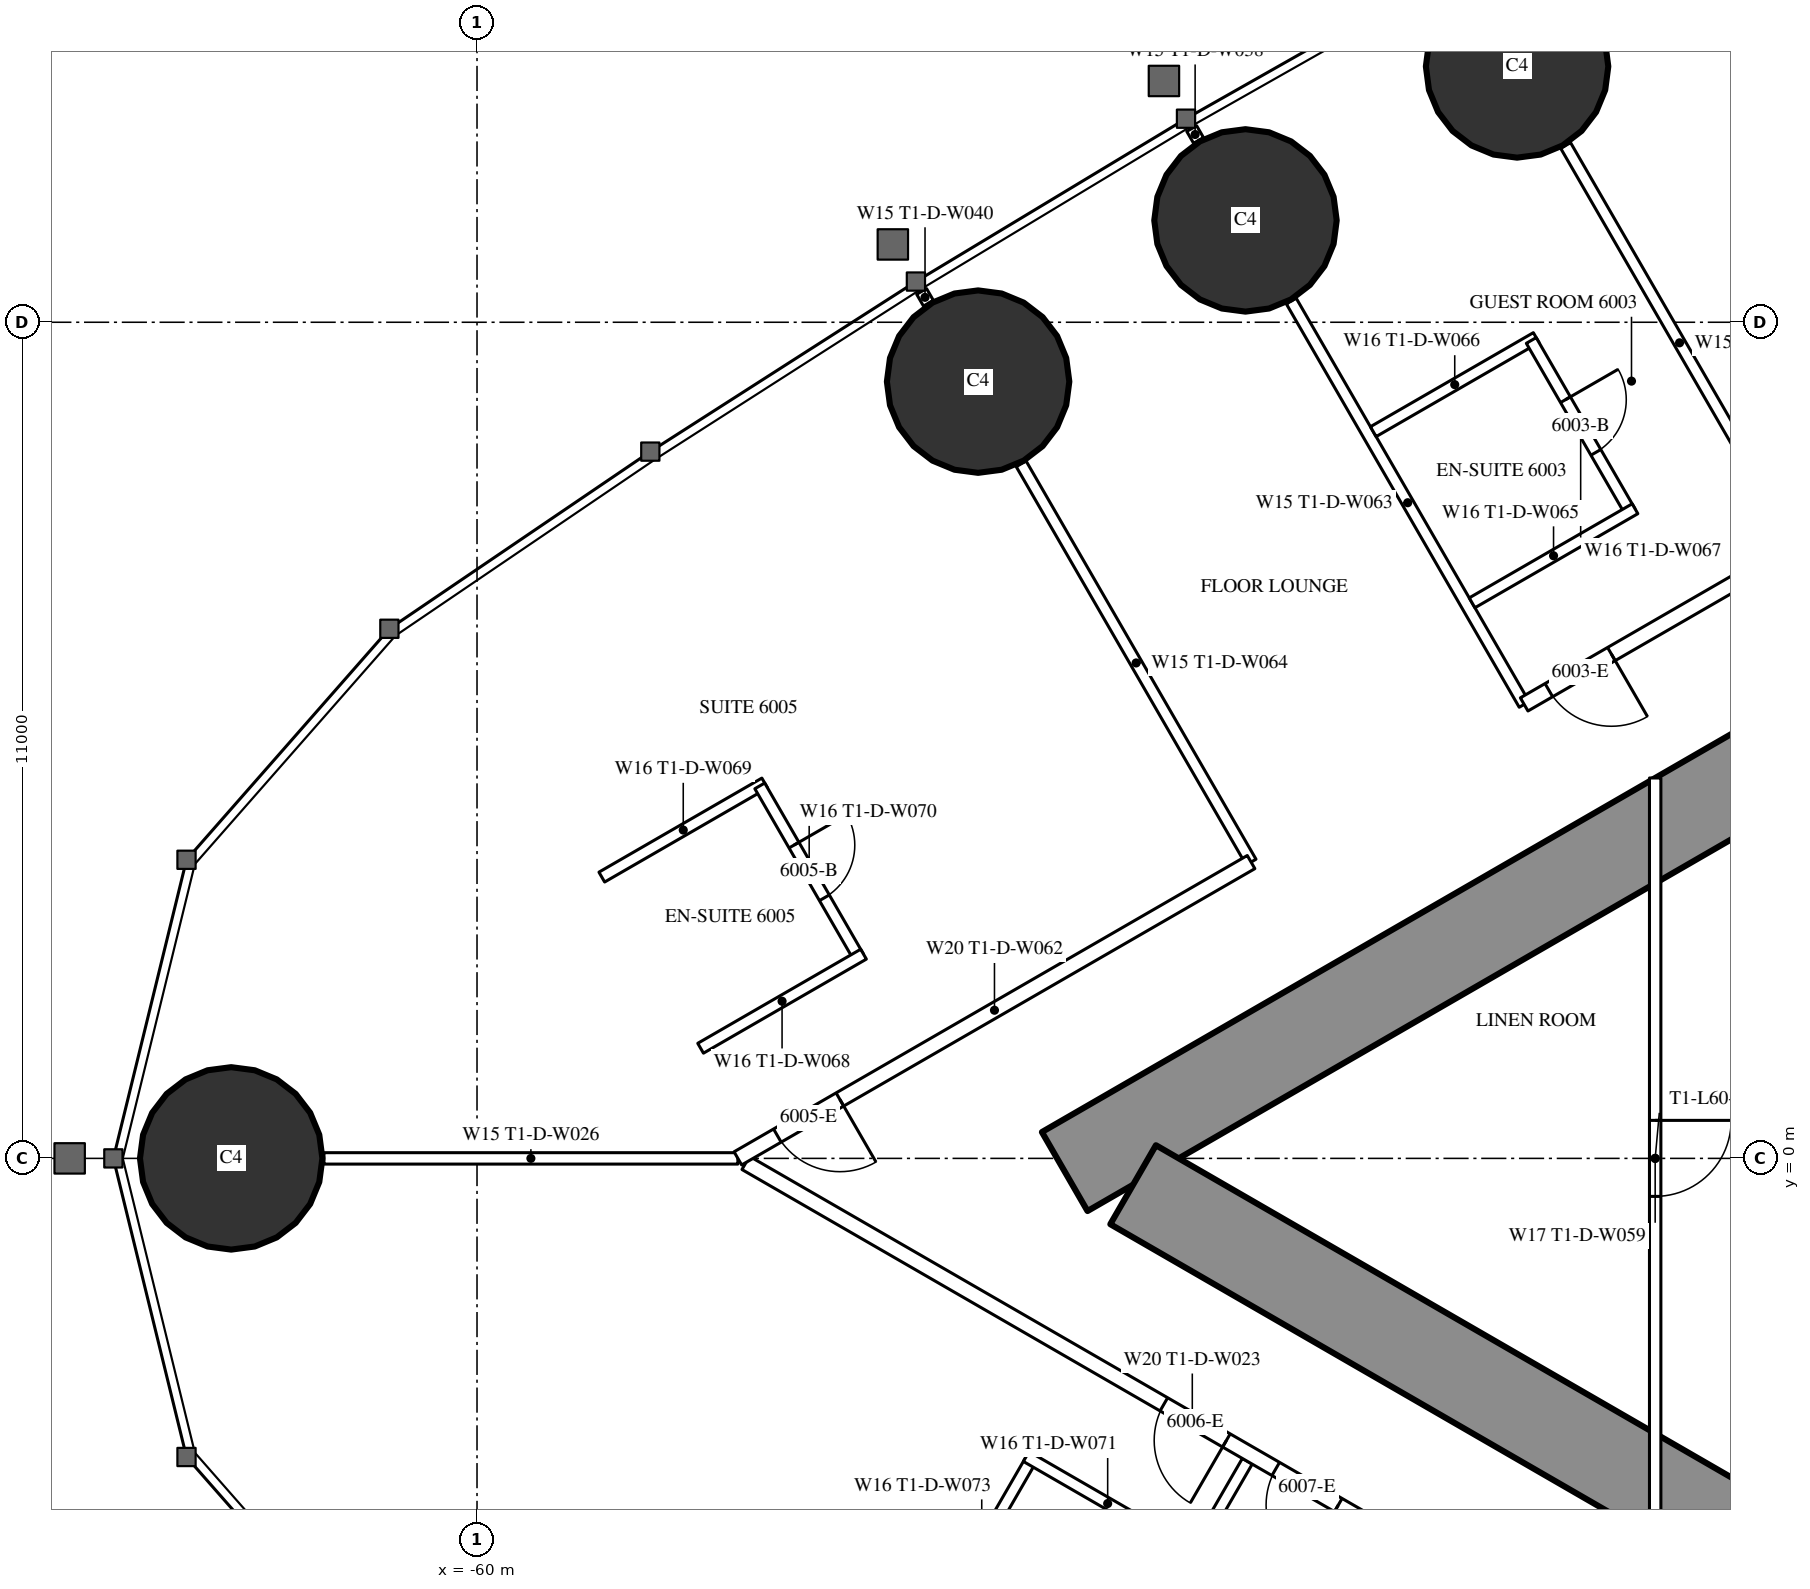
"""IFC4 building model, lengths in metres.
Left out: names, types, materials, properties, quantities, classifications, styles, units other than length and angle.
Written with IfcOpenShell. Run it as: python <this file> out.ifc"""

import sys

from ifc_helpers import new_model, si_unit, direction, frame, frame_2d, origin, origin_2d, place, context, subcontext, project, spatial, rectangle, circle, extrude, element, fill, save


model = new_model("IFC4")
c1 = context("Model", 3, precision=1e-05, world=origin(), true_north=direction((0.0, 1.0)))
c2 = subcontext(c1, "Body", "Model", "MODEL_VIEW")
j1 = project(units=[si_unit("LENGTHUNIT", "METRE"), si_unit("PLANEANGLEUNIT", "RADIAN")], contexts=[c1])
p1 = place(None, origin())
s1 = spatial("IfcSite", under=j1, at=p1, CompositionType="ELEMENT")
p2 = place(p1, origin())
s2 = spatial("IfcBuilding", under=s1, at=p2, CompositionType="ELEMENT")
p3 = place(p2, frame((0.0, 0.0, 226.1)))
s3 = spatial("IfcBuildingStorey", under=s2, at=p3, CompositionType="ELEMENT", Elevation=226.1)
for number, where, z_axis, x_axis in (
    (1, (-63.234, 0.0, 0.0), (0.0, 0.0, 1.0), (1.0, 0.0, 0.0)),
    (2, (-46.317, 14.365, 0.0), (0.0, 0.0, 1.0), (1.0, 0.0, 0.0)),
    (3, (-49.89, 12.34, 0.0), (0.0, 0.0, 1.0), (1.0, 0.0, 0.0)),
    (4, (-53.408, 10.219, 0.0), (0.0, 0.0, 1.0), (1.0, 0.0, 0.0)),
):
    element("IfcColumn", number, at=place(p3, frame(where, z_axis=z_axis, x_axis=x_axis)), inside=s3, PredefinedType="COLUMN", context=c2, shape_type="SweptSolid", body=[
        extrude(circle(Radius=1.2, at=origin_2d()), origin(), (0.0, 0.0, 1.0), 3.6),
    ])
p4 = place(p3, frame((-27.2, 14.3, 0.0), z_axis=(0.0, 0.0, 1.0), x_axis=(-0.866026593062, -0.499997940104, 0.0)))
e5 = element("IfcWall", 5, at=p4, inside=s3, PredefinedType="SHEAR", context=c2, shape_type="SweptSolid", body=[
    extrude(rectangle(XDim=28.946, YDim=1.2, at=frame_2d((14.473, 0.0))), origin(), (0.0, 0.0, 1.0), 3.6),
])
p5 = place(p4, frame((4.6, 0.0, 0.0)))
e6 = element("IfcOpeningElement", 6, at=p5, cuts=e5, PredefinedType="OPENING", context=c2, shape_type="SweptSolid", body=[
    extrude(rectangle(XDim=1.0, YDim=2.2, at=frame_2d((0.5, 1.1))), frame((0.0, 0.61, 0.0), z_axis=(0.0, -1.0, 0.0), x_axis=(1.0, 0.0, 0.0)), (0.0, 0.0, 1.0), 1.22),
])
p6 = place(p4, frame((13.395, 0.0, 0.0)))
e7 = element("IfcOpeningElement", 7, at=p6, cuts=e5, PredefinedType="OPENING", context=c2, shape_type="SweptSolid", body=[
    extrude(rectangle(XDim=1.8, YDim=2.2, at=frame_2d((0.9, 1.1))), frame((0.0, 0.61, 0.0), z_axis=(0.0, -1.0, 0.0), x_axis=(1.0, 0.0, 0.0)), (0.0, 0.0, 1.0), 1.22),
])
p7 = place(p3, frame((-27.2, -14.3, 0.0), z_axis=(0.0, 0.0, 1.0), x_axis=(-0.866024021859, 0.500002393557, 0.0)))
e8 = element("IfcWall", 8, at=p7, inside=s3, PredefinedType="SHEAR", context=c2, shape_type="SweptSolid", body=[
    extrude(rectangle(XDim=27.907, YDim=1.2, at=frame_2d((13.954, 0.0))), origin(), (0.0, 0.0, 1.0), 3.6),
])
p8 = place(p7, frame((4.6, 0.0, 0.0)))
e9 = element("IfcOpeningElement", 9, at=p8, cuts=e8, PredefinedType="OPENING", context=c2, shape_type="SweptSolid", body=[
    extrude(rectangle(XDim=1.0, YDim=2.2, at=frame_2d((0.5, 1.1))), frame((0.0, 0.61, 0.0), z_axis=(0.0, -1.0, 0.0), x_axis=(1.0, 0.0, 0.0)), (0.0, 0.0, 1.0), 1.22),
])
p9 = place(p7, frame((13.395, 0.0, 0.0)))
e10 = element("IfcOpeningElement", 10, at=p9, cuts=e8, PredefinedType="OPENING", context=c2, shape_type="SweptSolid", body=[
    extrude(rectangle(XDim=1.8, YDim=2.2, at=frame_2d((0.9, 1.1))), frame((0.0, 0.61, 0.0), z_axis=(0.0, -1.0, 0.0), x_axis=(1.0, 0.0, 0.0)), (0.0, 0.0, 1.0), 1.22),
])
p10 = place(p3, frame((-42.68, 8.134, 0.0), z_axis=(0.0, 0.0, 1.0), x_axis=(-0.499984479505, 0.866034364361, 0.0)))
e11 = element("IfcWall", 11, at=p10, inside=s3, PredefinedType="PARTITIONING", context=c2, shape_type="SweptSolid", body=[
    extrude(rectangle(XDim=5.995, YDim=0.15, at=frame_2d((2.998, 0.0))), origin(), (0.0, 0.0, 1.0), 2.45),
])
p11 = place(p3, frame((-46.224, 5.972, 0.0), z_axis=(0.0, 0.0, 1.0), x_axis=(-0.500021351822, 0.866013075953, 0.0)))
e12 = element("IfcWall", 12, at=p11, inside=s3, PredefinedType="PARTITIONING", context=c2, shape_type="SweptSolid", body=[
    extrude(rectangle(XDim=6.128, YDim=0.15, at=frame_2d((3.064, 0.0))), origin(), (0.0, 0.0, 1.0), 2.45),
])
p12 = place(p3, frame((-50.508, 13.392, 0.0), z_axis=(0.0, 0.0, 1.0), x_axis=(-0.499644091975, 0.866230789891, 0.0)))
e13 = element("IfcWall", 13, at=p12, inside=s3, PredefinedType="PARTITIONING", context=c2, shape_type="SweptSolid", body=[
    extrude(rectangle(XDim=0.18, YDim=0.15, at=frame_2d((0.09, 0.0))), origin(), (0.0, 0.0, 1.0), 2.45),
])
p13 = place(p3, frame((-49.816, 3.898, 0.0), z_axis=(0.0, 0.0, 1.0), x_axis=(-0.500001913541, 0.866024298998, 0.0)))
e14 = element("IfcWall", 14, at=p13, inside=s3, PredefinedType="PARTITIONING", context=c2, shape_type="SweptSolid", body=[
    extrude(rectangle(XDim=6.05, YDim=0.15, at=frame_2d((3.025, 0.0))), origin(), (0.0, 0.0, 1.0), 2.45),
])
p14 = place(p3, frame((-54.061, 11.25, 0.0), z_axis=(0.0, 0.0, 1.0), x_axis=(-0.500391173478, 0.865799441849, 0.0)))
e15 = element("IfcWall", 15, at=p14, inside=s3, PredefinedType="PARTITIONING", context=c2, shape_type="SweptSolid", body=[
    extrude(rectangle(XDim=0.179, YDim=0.15, at=frame_2d((0.089, 0.0))), origin(), (0.0, 0.0, 1.0), 2.45),
])
p15 = place(p3, frame((-49.866, -3.985, 0.0), z_axis=(0.0, 0.0, 1.0), x_axis=(-0.500000694566, -0.866025002776, 0.0)))
e16 = element("IfcWall", 16, at=p15, inside=s3, PredefinedType="PARTITIONING", context=c2, shape_type="SweptSolid", body=[
    extrude(rectangle(XDim=5.95, YDim=0.15, at=frame_2d((2.975, 0.0))), origin(), (0.0, 0.0, 1.0), 2.45),
])
p16 = place(p3, frame((-56.568, 0.0, 0.0), z_axis=(0.0, 0.0, 1.0), x_axis=(-1.0, 0.0, 0.0)))
e17 = element("IfcWall", 17, at=p16, inside=s3, PredefinedType="PARTITIONING", context=c2, shape_type="SweptSolid", body=[
    extrude(rectangle(XDim=5.446, YDim=0.15, at=frame_2d((2.723, 0.0))), origin(), (0.0, 0.0, 1.0), 2.45),
])
p17 = place(p3, frame((-44.715, -6.844, 0.0), z_axis=(0.0, 0.0, 1.0), x_axis=(-0.866025261224, 0.500000246922, 0.0)))
e18 = element("IfcWall", 18, at=p17, inside=s3, PredefinedType="PARTITIONING", context=c2, shape_type="SweptSolid", body=[
    extrude(rectangle(XDim=13.567, YDim=0.2, at=frame_2d((6.783, 0.0))), origin(), (0.0, 0.0, 1.0), 3.35),
])
p18 = place(p17, frame((6.266, 0.0, 0.0)))
e19 = element("IfcOpeningElement", 19, at=p18, cuts=e18, PredefinedType="OPENING", context=c2, shape_type="SweptSolid", body=[
    extrude(rectangle(XDim=0.95, YDim=2.2, at=frame_2d((0.475, 1.1))), frame((0.0, 0.11, 0.0), z_axis=(0.0, -1.0, 0.0), x_axis=(1.0, 0.0, 0.0)), (0.0, 0.0, 1.0), 0.22),
])
p19 = place(p17, frame((4.565, 0.0, 0.0)))
e20 = element("IfcOpeningElement", 20, at=p19, cuts=e18, PredefinedType="OPENING", context=c2, shape_type="SweptSolid", body=[
    extrude(rectangle(XDim=0.95, YDim=2.2, at=frame_2d((0.475, 1.1))), frame((0.0, 0.11, 0.0), z_axis=(0.0, -1.0, 0.0), x_axis=(1.0, 0.0, 0.0)), (0.0, 0.0, 1.0), 0.22),
])
p20 = place(p17, frame((0.5, 0.0, 0.0)))
e21 = element("IfcOpeningElement", 21, at=p20, cuts=e18, PredefinedType="OPENING", context=c2, shape_type="SweptSolid", body=[
    extrude(rectangle(XDim=0.967, YDim=2.2, at=frame_2d((0.483, 1.1))), frame((0.0, 0.11, 0.0), z_axis=(0.0, -1.0, 0.0), x_axis=(1.0, 0.0, 0.0)), (0.0, 0.0, 1.0), 0.22),
])
p21 = place(p3, frame((-46.065, 10.798, 0.0), z_axis=(0.0, 0.0, 1.0), x_axis=(-0.866031185235, -0.4999899861, 0.0)))
e22 = element("IfcWall", 22, at=p21, inside=s3, PredefinedType="PARTITIONING", context=c2, shape_type="SweptSolid", body=[
    extrude(rectangle(XDim=2.475, YDim=0.15, at=frame_2d((1.238, 0.0))), origin(), (0.0, 0.0, 1.0), 3.35),
])
p22 = place(p3, frame((-44.83, 8.509, 0.0), z_axis=(0.0, 0.0, 1.0), x_axis=(-0.499936506574, 0.866062058628, 0.0)))
e23 = element("IfcWall", 23, at=p22, inside=s3, PredefinedType="PARTITIONING", context=c2, shape_type="SweptSolid", body=[
    extrude(rectangle(XDim=2.6, YDim=0.15, at=frame_2d((1.3, 0.0))), origin(), (0.0, 0.0, 1.0), 3.35),
])
p23 = place(p22, frame((0.9, 0.0, 0.0)))
e24 = element("IfcOpeningElement", 24, at=p23, cuts=e23, PredefinedType="OPENING", context=c2, shape_type="SweptSolid", body=[
    extrude(rectangle(XDim=0.8, YDim=2.2, at=frame_2d((0.4, 1.1))), frame((0.0, 0.085, 0.0), z_axis=(0.0, -1.0, 0.0), x_axis=(1.0, 0.0, 0.0)), (0.0, 0.0, 1.0), 0.17),
])
for number, where, z_axis, x_axis in (
    (25, (-44.765, 8.546, 0.0), (0.0, 0.0, 1.0), (-0.866, -0.5, 0.0)),
    (26, (-56.215, 4.938, 0.0), (0.0, 0.0, 1.0), (-0.866, -0.5, 0.0)),
):
    element("IfcWall", number, at=place(p3, frame(where, z_axis=z_axis, x_axis=x_axis)), inside=s3, PredefinedType="PARTITIONING", context=c2, shape_type="SweptSolid", body=[
        extrude(rectangle(XDim=2.475, YDim=0.15, at=frame_2d((1.237, 0.0))), origin(), (0.0, 0.0, 1.0), 3.35),
    ])
p24 = place(p3, frame((-54.98, 2.649, 0.0), z_axis=(0.0, 0.0, 1.0), x_axis=(-0.500006934395, 0.866021400173, 0.0)))
e27 = element("IfcWall", 27, at=p24, inside=s3, PredefinedType="PARTITIONING", context=c2, shape_type="SweptSolid", body=[
    extrude(rectangle(XDim=2.6, YDim=0.15, at=frame_2d((1.3, 0.0))), origin(), (0.0, 0.0, 1.0), 3.35),
])
p25 = place(p24, frame((0.9, 0.0, 0.0)))
e28 = element("IfcOpeningElement", 28, at=p25, cuts=e27, PredefinedType="OPENING", context=c2, shape_type="SweptSolid", body=[
    extrude(rectangle(XDim=0.8, YDim=2.2, at=frame_2d((0.4, 1.1))), frame((0.0, 0.085, 0.0), z_axis=(0.0, -1.0, 0.0), x_axis=(1.0, 0.0, 0.0)), (0.0, 0.0, 1.0), 0.17),
])
p26 = place(p3, frame((-54.915, 2.687, 0.0), z_axis=(0.0, 0.0, 1.0), x_axis=(-0.866006523861, -0.500032699561, 0.0)))
e29 = element("IfcWall", 29, at=p26, inside=s3, PredefinedType="PARTITIONING", context=c2, shape_type="SweptSolid", body=[
    extrude(rectangle(XDim=2.475, YDim=0.15, at=frame_2d((1.237, 0.0))), origin(), (0.0, 0.0, 1.0), 3.35),
])
p27 = place(p3, frame((-52.71, -3.96, 0.0), z_axis=(0.0, 0.0, 1.0), x_axis=(-0.500006934395, -0.866021400173, 0.0)))
e30 = element("IfcWall", 30, at=p27, inside=s3, PredefinedType="PARTITIONING", context=c2, shape_type="SweptSolid", body=[
    extrude(rectangle(XDim=2.6, YDim=0.15, at=frame_2d((1.3, 0.0))), origin(), (0.0, 0.0, 1.0), 3.35),
])
p28 = place(p27, frame((0.9, 0.0, 0.0)))
e31 = element("IfcOpeningElement", 31, at=p28, cuts=e30, PredefinedType="OPENING", context=c2, shape_type="SweptSolid", body=[
    extrude(rectangle(XDim=0.8, YDim=2.2, at=frame_2d((0.4, 1.1))), frame((0.0, 0.085, 0.0), z_axis=(0.0, -1.0, 0.0), x_axis=(1.0, 0.0, 0.0)), (0.0, 0.0, 1.0), 0.17),
])
p29 = place(p3, frame((-50.631, -5.16, 0.0), z_axis=(0.0, 0.0, 1.0), x_axis=(-0.86604923931, 0.499958713387, 0.0)))
e32 = element("IfcWall", 32, at=p29, inside=s3, PredefinedType="PARTITIONING", context=c2, shape_type="SweptSolid", body=[
    extrude(rectangle(XDim=2.475, YDim=0.15, at=frame_2d((1.237, 0.0))), origin(), (0.0, 0.0, 1.0), 2.5),
])
p30 = place(p3, frame((-28.737, 16.068, 0.0), z_axis=(0.0, 0.0, 1.0), x_axis=(-0.866023901326, -0.500002602325, 0.0)))
e33 = element("IfcWall", 33, at=p30, inside=s3, PredefinedType="PARTITIONING", context=c2, shape_type="SweptSolid", body=[
    extrude(rectangle(XDim=20.192, YDim=0.2, at=frame_2d((10.096, 0.0))), origin(), (0.0, 0.0, 1.0), 3.35),
])
p31 = place(p30, frame((1.08, 0.0, 0.0)))
e34 = element("IfcOpeningElement", 34, at=p31, cuts=e33, PredefinedType="OPENING", context=c2, shape_type="SweptSolid", body=[
    extrude(rectangle(XDim=1.8, YDim=2.04, at=frame_2d((0.9, 1.02))), frame((0.0, 0.11, 0.0), z_axis=(0.0, -1.0, 0.0), x_axis=(1.0, 0.0, 0.0)), (0.0, 0.0, 1.0), 0.22),
])
p32 = place(p30, frame((6.86, 0.0, 0.0)))
e35 = element("IfcOpeningElement", 35, at=p32, cuts=e33, PredefinedType="OPENING", context=c2, shape_type="SweptSolid", body=[
    extrude(rectangle(XDim=1.0, YDim=2.2, at=frame_2d((0.5, 1.1))), frame((0.0, 0.11, 0.0), z_axis=(0.0, -1.0, 0.0), x_axis=(1.0, 0.0, 0.0)), (0.0, 0.0, 1.0), 0.22),
])
p33 = place(p30, frame((18.867, 0.0, 0.0)))
e36 = element("IfcOpeningElement", 36, at=p33, cuts=e33, PredefinedType="OPENING", context=c2, shape_type="SweptSolid", body=[
    extrude(rectangle(XDim=0.95, YDim=2.2, at=frame_2d((0.475, 1.1))), frame((0.0, 0.11, 0.0), z_axis=(0.0, -1.0, 0.0), x_axis=(1.0, 0.0, 0.0)), (0.0, 0.0, 1.0), 0.22),
])
p34 = place(p3, frame((-49.816, 3.898, 0.0), z_axis=(0.0, 0.0, 1.0), x_axis=(-0.866028102716, -0.499995325284, 0.0)))
e37 = element("IfcWall", 37, at=p34, inside=s3, PredefinedType="PARTITIONING", context=c2, shape_type="SweptSolid", body=[
    extrude(rectangle(XDim=7.796, YDim=0.2, at=frame_2d((3.898, 0.0))), origin(), (0.0, 0.0, 1.0), 3.35),
])
p35 = place(p34, frame((6.246, 0.0, 0.0)))
e38 = element("IfcOpeningElement", 38, at=p35, cuts=e37, PredefinedType="OPENING", context=c2, shape_type="SweptSolid", body=[
    extrude(rectangle(XDim=0.95, YDim=2.2, at=frame_2d((0.475, 1.1))), frame((0.0, 0.11, 0.0), z_axis=(0.0, -1.0, 0.0), x_axis=(1.0, 0.0, 0.0)), (0.0, 0.0, 1.0), 0.22),
])
p36 = place(p3, frame((-44.5, 5.005, 0.0), z_axis=(0.0, 0.0, 1.0), x_axis=(0.0, -1.0, 0.0)))
e39 = element("IfcWall", 39, at=p36, inside=s3, PredefinedType="PARTITIONING", context=c2, shape_type="SweptSolid", body=[
    extrude(rectangle(XDim=10.009, YDim=0.15, at=frame_2d((5.005, 0.0))), origin(), (0.0, 0.0, 1.0), 2.5),
])
p37 = place(p36, frame((4.505, 0.0, 0.0)))
e40 = element("IfcOpeningElement", 40, at=p37, cuts=e39, PredefinedType="OPENING", context=c2, shape_type="SweptSolid", body=[
    extrude(rectangle(XDim=1.0, YDim=2.2, at=frame_2d((0.5, 1.1))), frame((0.0, 0.085, 0.0), z_axis=(0.0, -1.0, 0.0), x_axis=(1.0, 0.0, 0.0)), (0.0, 0.0, 1.0), 0.17),
])
p38 = place(p23, origin())
e41 = element("IfcDoor", 41, at=p38, inside=s3, OperationType="SINGLE_SWING_RIGHT", PredefinedType="DOOR", context=c2, shape_type="SweptSolid", body=[
    extrude(rectangle(XDim=0.8, YDim=2.2, at=frame_2d((0.4, 1.1))), frame((0.0, 0.025, 0.0), z_axis=(0.0, -1.0, 0.0), x_axis=(1.0, 0.0, 0.0)), (0.0, 0.0, 1.0), 0.05),
])
fill(e24, e41)
p39 = place(p33, origin())
e42 = element("IfcDoor", 42, at=p39, inside=s3, OperationType="SINGLE_SWING_LEFT", PredefinedType="DOOR", context=c2, shape_type="SweptSolid", body=[
    extrude(rectangle(XDim=0.95, YDim=2.2, at=frame_2d((0.475, 1.1))), frame((0.0, 0.025, 0.0), z_axis=(0.0, -1.0, 0.0), x_axis=(1.0, 0.0, 0.0)), (0.0, 0.0, 1.0), 0.05),
])
fill(e36, e42)
p40 = place(p25, origin())
e43 = element("IfcDoor", 43, at=p40, inside=s3, OperationType="SINGLE_SWING_RIGHT", PredefinedType="DOOR", context=c2, shape_type="SweptSolid", body=[
    extrude(rectangle(XDim=0.8, YDim=2.2, at=frame_2d((0.4, 1.1))), frame((0.0, 0.025, 0.0), z_axis=(0.0, -1.0, 0.0), x_axis=(1.0, 0.0, 0.0)), (0.0, 0.0, 1.0), 0.05),
])
fill(e28, e43)
p41 = place(p35, origin())
e44 = element("IfcDoor", 44, at=p41, inside=s3, OperationType="SINGLE_SWING_LEFT", PredefinedType="DOOR", context=c2, shape_type="SweptSolid", body=[
    extrude(rectangle(XDim=0.95, YDim=2.2, at=frame_2d((0.475, 1.1))), frame((0.0, 0.025, 0.0), z_axis=(0.0, -1.0, 0.0), x_axis=(1.0, 0.0, 0.0)), (0.0, 0.0, 1.0), 0.05),
])
fill(e38, e44)
p42 = place(p18, origin())
e45 = element("IfcDoor", 45, at=p42, inside=s3, OperationType="SINGLE_SWING_LEFT", PredefinedType="DOOR", context=c2, shape_type="SweptSolid", body=[
    extrude(rectangle(XDim=0.95, YDim=2.2, at=frame_2d((0.475, 1.1))), frame((0.0, 0.025, 0.0), z_axis=(0.0, -1.0, 0.0), x_axis=(1.0, 0.0, 0.0)), (0.0, 0.0, 1.0), 0.05),
])
fill(e19, e45)
p43 = place(p19, origin())
e46 = element("IfcDoor", 46, at=p43, inside=s3, OperationType="SINGLE_SWING_LEFT", PredefinedType="DOOR", context=c2, shape_type="SweptSolid", body=[
    extrude(rectangle(XDim=0.95, YDim=2.2, at=frame_2d((0.475, 1.1))), frame((0.0, 0.025, 0.0), z_axis=(0.0, -1.0, 0.0), x_axis=(1.0, 0.0, 0.0)), (0.0, 0.0, 1.0), 0.05),
])
fill(e20, e46)
p44 = place(p37, origin())
e47 = element("IfcDoor", 47, at=p44, inside=s3, OperationType="SINGLE_SWING_LEFT", PredefinedType="DOOR", context=c2, shape_type="SweptSolid", body=[
    extrude(rectangle(XDim=1.0, YDim=2.2, at=frame_2d((0.5, 1.1))), frame((0.0, 0.025, 0.0), z_axis=(0.0, -1.0, 0.0), x_axis=(1.0, 0.0, 0.0)), (0.0, 0.0, 1.0), 0.05),
])
fill(e40, e47)
save(model, sys.argv[1])
